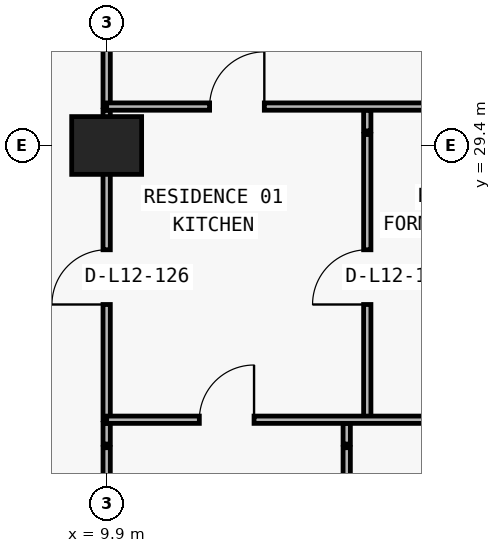
"""IFC4 building model, lengths in metres.
Left out: names, types, materials, properties, quantities, classifications, styles, units other than length and angle.
Written with IfcOpenShell. Run it as: python <this file> out.ifc"""

import sys

from ifc_helpers import new_model, si_unit, direction, frame, frame_2d, origin, origin_2d, place, context, subcontext, project, spatial, rectangle, extrude, element, fill, save


model = new_model("IFC4")
c1 = context("Model", 3, precision=1e-05, world=origin(), true_north=direction((0.0, 1.0)))
c2 = subcontext(c1, "Body", "Model", "MODEL_VIEW")
j1 = project(units=[si_unit("LENGTHUNIT", "METRE"), si_unit("PLANEANGLEUNIT", "RADIAN")], contexts=[c1])
p1 = place(None, origin())
s1 = spatial("IfcSite", under=j1, at=p1, CompositionType="ELEMENT")
p2 = place(p1, origin())
s2 = spatial("IfcBuilding", under=s1, at=p2, CompositionType="ELEMENT")
p3 = place(p2, frame((0.0, 0.0, 49.8)))
s3 = spatial("IfcBuildingStorey", under=s2, at=p3, CompositionType="ELEMENT", Elevation=49.8)
p4 = place(p3, frame((9.9, 29.4, 0.0), z_axis=(0.0, 0.0, 1.0), x_axis=(1.0, 0.0, 0.0)))
e1 = element("IfcColumn", 1, at=p4, inside=s3, PredefinedType="COLUMN", context=c2, shape_type="SweptSolid", body=[
    extrude(rectangle(XDim=1.15, YDim=0.95, at=origin_2d()), origin(), (0.0, 0.0, 1.0), 3.05),
])
p5 = place(p3, frame((9.9, 6.24, 0.0), z_axis=(0.0, 0.0, 1.0), x_axis=(0.0, 1.0, 0.0)))
e2 = element("IfcWall", 2, at=p5, inside=s3, PredefinedType="PARTITIONING", context=c2, shape_type="SweptSolid", body=[
    extrude(rectangle(XDim=18.19, YDim=0.12, at=frame_2d((9.095, 0.0))), origin(), (0.0, 0.0, 1.0), 2.11),
])
p6 = place(p3, frame((9.9, 24.49, 0.0), z_axis=(0.0, 0.0, 1.0), x_axis=(0.0, 1.0, 0.0)))
e3 = element("IfcWall", 3, at=p6, inside=s3, PredefinedType="PARTITIONING", context=c2, shape_type="SweptSolid", body=[
    extrude(rectangle(XDim=0.34, YDim=0.12, at=frame_2d((0.17, 0.0))), origin(), (0.0, 0.0, 1.0), 2.11),
])
p7 = place(p3, frame((9.9, 24.89, 0.0), z_axis=(0.0, 0.0, 1.0), x_axis=(0.0, 1.0, 0.0)))
e4 = element("IfcWall", 4, at=p7, inside=s3, PredefinedType="PARTITIONING", context=c2, shape_type="SweptSolid", body=[
    extrude(rectangle(XDim=4.69, YDim=0.12, at=frame_2d((2.345, 0.0))), origin(), (0.0, 0.0, 1.0), 2.11),
])
p8 = place(p7, frame((1.895, 0.0, 0.0)))
e5 = element("IfcOpeningElement", 5, at=p8, cuts=e4, PredefinedType="OPENING", context=c2, shape_type="SweptSolid", body=[
    extrude(rectangle(XDim=0.9, YDim=2.06, at=frame_2d((0.45, 1.03))), frame((0.0, 0.07, 0.0), z_axis=(0.0, -1.0, 0.0), x_axis=(1.0, 0.0, 0.0)), (0.0, 0.0, 1.0), 0.14),
])
p9 = place(p3, frame((9.9, 29.64, 0.0), z_axis=(0.0, 0.0, 1.0), x_axis=(0.0, 1.0, 0.0)))
e6 = element("IfcWall", 6, at=p9, inside=s3, PredefinedType="PARTITIONING", context=c2, shape_type="SweptSolid", body=[
    extrude(rectangle(XDim=0.34, YDim=0.12, at=frame_2d((0.17, 0.0))), origin(), (0.0, 0.0, 1.0), 2.11),
])
p10 = place(p3, frame((9.9, 30.04, 0.0), z_axis=(0.0, 0.0, 1.0), x_axis=(0.0, 1.0, 0.0)))
e7 = element("IfcWall", 7, at=p10, inside=s3, PredefinedType="PARTITIONING", context=c2, shape_type="SweptSolid", body=[
    extrude(rectangle(XDim=4.56, YDim=0.12, at=frame_2d((2.28, 0.0))), origin(), (0.0, 0.0, 1.0), 2.11),
])
p11 = place(p3, frame((13.848, 6.24, 0.0), z_axis=(0.0, 0.0, 1.0), x_axis=(0.0, 1.0, 0.0)))
e8 = element("IfcWall", 8, at=p11, inside=s3, PredefinedType="PARTITIONING", context=c2, shape_type="SweptSolid", body=[
    extrude(rectangle(XDim=18.19, YDim=0.12, at=frame_2d((9.095, 0.0))), origin(), (0.0, 0.0, 1.0), 3.05),
])
p12 = place(p3, frame((13.848, 24.49, 0.0), z_axis=(0.0, 0.0, 1.0), x_axis=(0.0, 1.0, 0.0)))
e9 = element("IfcWall", 9, at=p12, inside=s3, PredefinedType="PARTITIONING", context=c2, shape_type="SweptSolid", body=[
    extrude(rectangle(XDim=0.34, YDim=0.12, at=frame_2d((0.17, 0.0))), origin(), (0.0, 0.0, 1.0), 3.05),
])
p13 = place(p3, frame((14.186, 24.89, 0.0), z_axis=(0.0, 0.0, 1.0), x_axis=(0.0, 1.0, 0.0)))
e10 = element("IfcWall", 10, at=p13, inside=s3, PredefinedType="PARTITIONING", context=c2, shape_type="SweptSolid", body=[
    extrude(rectangle(XDim=4.69, YDim=0.12, at=frame_2d((2.345, 0.0))), origin(), (0.0, 0.0, 1.0), 3.05),
])
p14 = place(p13, frame((1.895, 0.0, 0.0)))
e11 = element("IfcOpeningElement", 11, at=p14, cuts=e10, PredefinedType="OPENING", context=c2, shape_type="SweptSolid", body=[
    extrude(rectangle(XDim=0.9, YDim=2.15, at=frame_2d((0.45, 1.075))), frame((0.0, 0.07, 0.0), z_axis=(0.0, -1.0, 0.0), x_axis=(1.0, 0.0, 0.0)), (0.0, 0.0, 1.0), 0.14),
])
p15 = place(p3, frame((14.186, 29.64, 0.0), z_axis=(0.0, 0.0, 1.0), x_axis=(0.0, 1.0, 0.0)))
e12 = element("IfcWall", 12, at=p15, inside=s3, PredefinedType="PARTITIONING", context=c2, shape_type="SweptSolid", body=[
    extrude(rectangle(XDim=0.34, YDim=0.12, at=frame_2d((0.17, 0.0))), origin(), (0.0, 0.0, 1.0), 3.05),
])
p16 = place(p3, frame((9.9, 24.89, 0.0), z_axis=(0.0, 0.0, 1.0), x_axis=(1.0, 0.0, 0.0)))
e13 = element("IfcWall", 13, at=p16, inside=s3, PredefinedType="PARTITIONING", context=c2, shape_type="SweptSolid", body=[
    extrude(rectangle(XDim=8.4, YDim=0.12, at=frame_2d((4.2, 0.0))), origin(), (0.0, 0.0, 1.0), 3.05),
])
p17 = place(p16, frame((1.524, 0.0, 0.0)))
e14 = element("IfcOpeningElement", 14, at=p17, cuts=e13, PredefinedType="OPENING", context=c2, shape_type="SweptSolid", body=[
    extrude(rectangle(XDim=0.9, YDim=2.15, at=frame_2d((0.45, 1.075))), frame((0.0, 0.07, 0.0), z_axis=(0.0, -1.0, 0.0), x_axis=(1.0, 0.0, 0.0)), (0.0, 0.0, 1.0), 0.14),
])
p18 = place(p16, frame((5.893, 0.0, 0.0)))
e15 = element("IfcOpeningElement", 15, at=p18, cuts=e13, PredefinedType="OPENING", context=c2, shape_type="SweptSolid", body=[
    extrude(rectangle(XDim=0.9, YDim=2.15, at=frame_2d((0.45, 1.075))), frame((0.0, 0.07, 0.0), z_axis=(0.0, -1.0, 0.0), x_axis=(1.0, 0.0, 0.0)), (0.0, 0.0, 1.0), 0.14),
])
p19 = place(p3, frame((9.9, 30.04, 0.0), z_axis=(0.0, 0.0, 1.0), x_axis=(1.0, 0.0, 0.0)))
e16 = element("IfcWall", 16, at=p19, inside=s3, PredefinedType="PARTITIONING", context=c2, shape_type="SweptSolid", body=[
    extrude(rectangle(XDim=8.4, YDim=0.12, at=frame_2d((4.2, 0.0))), origin(), (0.0, 0.0, 1.0), 3.05),
])
p20 = place(p19, frame((1.693, 0.0, 0.0)))
e17 = element("IfcOpeningElement", 17, at=p20, cuts=e16, PredefinedType="OPENING", context=c2, shape_type="SweptSolid", body=[
    extrude(rectangle(XDim=0.9, YDim=2.15, at=frame_2d((0.45, 1.075))), frame((0.0, 0.07, 0.0), z_axis=(0.0, -1.0, 0.0), x_axis=(1.0, 0.0, 0.0)), (0.0, 0.0, 1.0), 0.14),
])
p21 = place(p20, origin())
e18 = element("IfcDoor", 18, at=p21, inside=s3, OperationType="SINGLE_SWING_RIGHT", PredefinedType="DOOR", context=c2, shape_type="SweptSolid", body=[
    extrude(rectangle(XDim=0.9, YDim=2.15, at=frame_2d((0.45, 1.075))), frame((0.0, 0.025, 0.0), z_axis=(0.0, -1.0, 0.0), x_axis=(1.0, 0.0, 0.0)), (0.0, 0.0, 1.0), 0.05),
])
fill(e17, e18)
p22 = place(p14, origin())
e19 = element("IfcDoor", 19, at=p22, inside=s3, OperationType="SINGLE_SWING_LEFT", PredefinedType="DOOR", context=c2, shape_type="SweptSolid", body=[
    extrude(rectangle(XDim=0.9, YDim=2.15, at=frame_2d((0.45, 1.075))), frame((0.0, 0.025, 0.0), z_axis=(0.0, -1.0, 0.0), x_axis=(1.0, 0.0, 0.0)), (0.0, 0.0, 1.0), 0.05),
])
fill(e11, e19)
p23 = place(p17, origin())
e20 = element("IfcDoor", 20, at=p23, inside=s3, OperationType="SINGLE_SWING_RIGHT", PredefinedType="DOOR", context=c2, shape_type="SweptSolid", body=[
    extrude(rectangle(XDim=0.9, YDim=2.15, at=frame_2d((0.45, 1.075))), frame((0.0, 0.025, 0.0), z_axis=(0.0, -1.0, 0.0), x_axis=(1.0, 0.0, 0.0)), (0.0, 0.0, 1.0), 0.05),
])
fill(e14, e20)
p24 = place(p8, origin())
e21 = element("IfcDoor", 21, at=p24, inside=s3, OperationType="SINGLE_SWING_LEFT", PredefinedType="DOOR", context=c2, shape_type="SweptSolid", body=[
    extrude(rectangle(XDim=0.9, YDim=2.06, at=frame_2d((0.45, 1.03))), frame((0.0, 0.025, 0.0), z_axis=(0.0, -1.0, 0.0), x_axis=(1.0, 0.0, 0.0)), (0.0, 0.0, 1.0), 0.05),
])
fill(e5, e21)
save(model, sys.argv[1])
